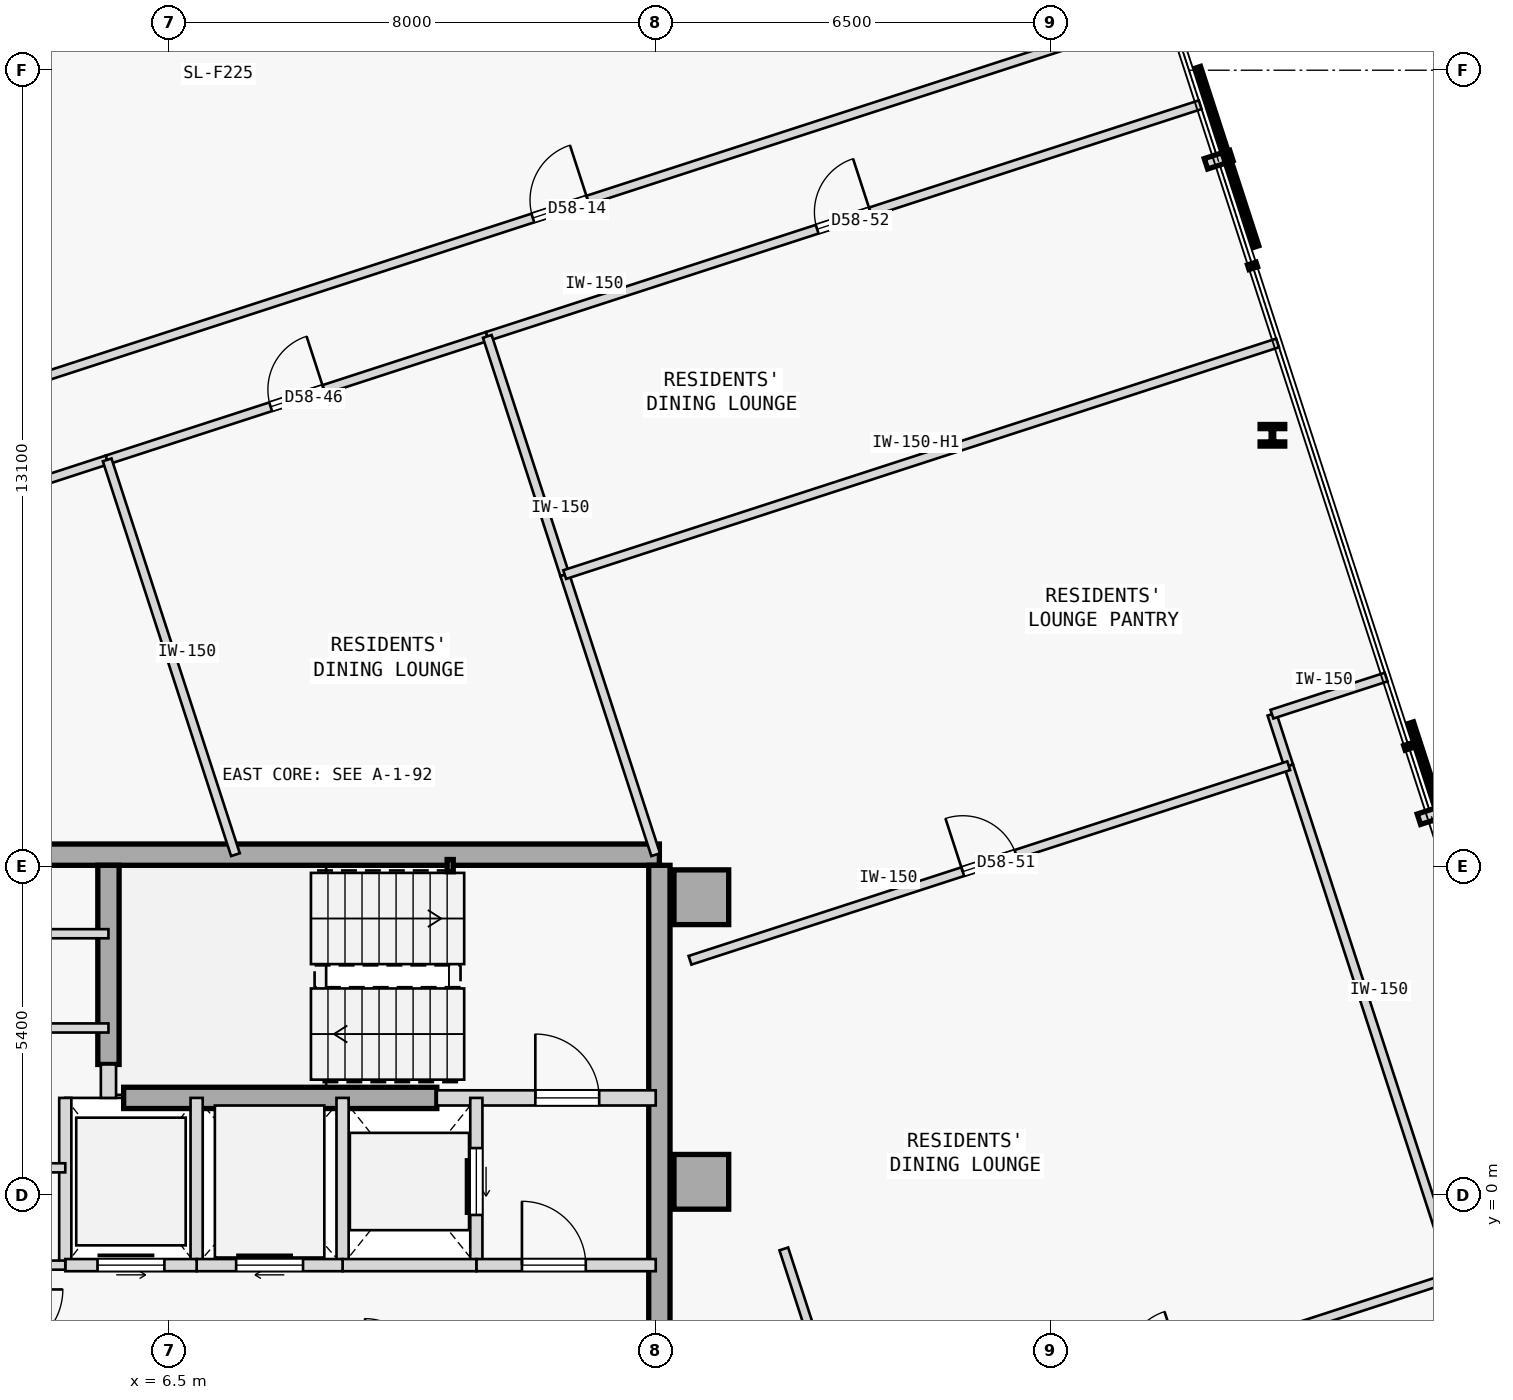
"""IFC4 building model, lengths in metres.
Left out: names, types, materials, properties, quantities, classifications, styles, units other than length and angle.
Written with IfcOpenShell. Run it as: python <this file> out.ifc"""

import sys

from ifc_helpers import new_model, si_unit, direction, frame, frame_2d, origin, origin_2d, place, context, subcontext, project, spatial, rectangle, hollow_rectangle, i_section, extrude, element, fill, save


model = new_model("IFC4")
c1 = context("Model", 3, precision=1e-05, world=origin(), true_north=direction((0.0, 1.0)))
c2 = subcontext(c1, "Body", "Model", "MODEL_VIEW")
j1 = project(units=[si_unit("LENGTHUNIT", "METRE"), si_unit("PLANEANGLEUNIT", "RADIAN")], contexts=[c1])
p1 = place(None, origin())
s1 = spatial("IfcSite", under=j1, at=p1, CompositionType="ELEMENT")
p2 = place(p1, origin())
s2 = spatial("IfcBuilding", under=s1, at=p2, CompositionType="ELEMENT")
p3 = place(p2, frame((0.0, 0.0, 220.95)))
s3 = spatial("IfcBuildingStorey", under=s2, at=p3, CompositionType="ELEMENT", Elevation=220.95)
for number, where, z_axis, x_axis in (
    (1, (15.25, 4.9, 0.0), (0.0, 0.0, 1.0), (1.0, 0.0, 0.0)),
    (2, (15.25, 0.22, 0.0), (0.0, 0.0, 1.0), (1.0, 0.0, 0.0)),
):
    element("IfcColumn", number, at=place(p3, frame(where, z_axis=z_axis, x_axis=x_axis)), inside=s3, PredefinedType="COLUMN", context=c2, shape_type="SweptSolid", body=[
        extrude(rectangle(XDim=0.9, YDim=0.9, at=origin_2d()), origin(), (0.0, 0.0, 1.0), 3.35),
    ])
p4 = place(p3, frame((3.15, 5.6, 0.0), z_axis=(0.0, 0.0, 1.0), x_axis=(1.0, 0.0, 0.0)))
e3 = element("IfcWall", 3, at=p4, inside=s3, PredefinedType="SHEAR", context=c2, shape_type="SweptSolid", body=[
    extrude(rectangle(XDim=11.41, YDim=0.35, at=frame_2d((5.705, 0.0))), origin(), (0.0, 0.0, 1.0), 3.125),
])
p5 = place(p3, frame((14.56, -5.425, 0.0), z_axis=(0.0, 0.0, 1.0), x_axis=(0.0, 1.0, 0.0)))
e4 = element("IfcWall", 4, at=p5, inside=s3, PredefinedType="SHEAR", context=c2, shape_type="SweptSolid", body=[
    extrude(rectangle(XDim=10.85, YDim=0.35, at=frame_2d((5.425, 0.0))), origin(), (0.0, 0.0, 1.0), 3.125),
])
p6 = place(p3, frame((5.5, 2.15, 0.0), z_axis=(0.0, 0.0, 1.0), x_axis=(0.0, 1.0, 0.0)))
e5 = element("IfcWall", 5, at=p6, inside=s3, PredefinedType="SHEAR", context=c2, shape_type="SweptSolid", body=[
    extrude(rectangle(XDim=3.275, YDim=0.35, at=frame_2d((1.638, 0.0))), origin(), (0.0, 0.0, 1.0), 3.125),
])
p7 = place(p3, frame((5.75, 1.6, 0.0), z_axis=(0.0, 0.0, 1.0), x_axis=(1.0, 0.0, 0.0)))
e6 = element("IfcWall", 6, at=p7, inside=s3, PredefinedType="SHEAR", context=c2, shape_type="SweptSolid", body=[
    extrude(rectangle(XDim=5.15, YDim=0.35, at=frame_2d((2.575, 0.0))), origin(), (0.0, 0.0, 1.0), 3.125),
])
p8 = place(p3, frame((11.12, 5.42, 0.0), z_axis=(0.0, 0.0, 1.0), x_axis=(1.0, 0.0, 0.0)))
e7 = element("IfcColumn", 7, at=p8, inside=s3, PredefinedType="COLUMN", context=c2, shape_type="SweptSolid", body=[
    extrude(hollow_rectangle(XDim=0.1, YDim=0.2, WallThickness=0.008, at=origin_2d()), origin(), (0.0, 0.0, 1.0), 3.35),
])
p9 = place(p3, frame((24.642, 12.497, 0.0), z_axis=(0.0, 0.0, 1.0), x_axis=(1.0, 0.0, 0.0)))
e8 = element("IfcColumn", 8, at=p9, inside=s3, PredefinedType="COLUMN", context=c2, shape_type="SweptSolid", body=[
    extrude(i_section(OverallWidth=0.405, OverallDepth=0.355, WebThickness=0.042, FlangeThickness=0.068, FilletRadius=0.015, at=origin_2d()), origin(), (0.0, 0.0, 1.0), 3.35),
])
p10 = place(p3, frame((10.9, 1.6, 0.0), z_axis=(0.0, 0.0, 1.0), x_axis=(1.0, 0.0, 0.0)))
e9 = element("IfcWall", 9, at=p10, inside=s3, PredefinedType="STANDARD", context=c2, shape_type="SweptSolid", body=[
    extrude(rectangle(XDim=3.6, YDim=0.25, at=frame_2d((1.8, 0.0))), origin(), (0.0, 0.0, 1.0), 3.125),
])
p11 = place(p10, frame((1.62, 0.0, 0.0)))
e10 = element("IfcOpeningElement", 10, at=p11, cuts=e9, PredefinedType="OPENING", context=c2, shape_type="SweptSolid", body=[
    extrude(rectangle(XDim=1.05, YDim=2.15, at=frame_2d((0.525, 1.075))), frame((0.0, 0.135, 0.0), z_axis=(0.0, -1.0, 0.0), x_axis=(1.0, 0.0, 0.0)), (0.0, 0.0, 1.0), 0.27),
])
p12 = place(p3, frame((5.5, 1.6, 0.0), z_axis=(0.0, 0.0, 1.0), x_axis=(0.0, 1.0, 0.0)))
e11 = element("IfcWall", 11, at=p12, inside=s3, PredefinedType="STANDARD", context=c2, shape_type="SweptSolid", body=[
    extrude(rectangle(XDim=0.55, YDim=0.25, at=frame_2d((0.275, 0.0))), origin(), (0.0, 0.0, 1.0), 3.125),
])
p13 = place(p3, frame((11.55, -1.15, 0.0), z_axis=(0.0, 0.0, 1.0), x_axis=(0.0, 1.0, 0.0)))
e12 = element("IfcWall", 12, at=p13, inside=s3, PredefinedType="STANDARD", context=c2, shape_type="SweptSolid", body=[
    extrude(rectangle(XDim=2.75, YDim=0.2, at=frame_2d((1.375, 0.0))), origin(), (0.0, 0.0, 1.0), 3.125),
])
p14 = place(p13, frame((0.825, 0.0, 0.0)))
e13 = element("IfcOpeningElement", 13, at=p14, cuts=e12, PredefinedType="OPENING", context=c2, shape_type="SweptSolid", body=[
    extrude(rectangle(XDim=1.1, YDim=2.15, at=frame_2d((0.55, 1.075))), frame((0.0, 0.11, 0.0), z_axis=(0.0, -1.0, 0.0), x_axis=(1.0, 0.0, 0.0)), (0.0, 0.0, 1.0), 0.22),
])
p15 = place(p3, frame((9.35, -1.15, 0.0), z_axis=(0.0, 0.0, 1.0), x_axis=(0.0, 1.0, 0.0)))
e14 = element("IfcWall", 14, at=p15, inside=s3, PredefinedType="STANDARD", context=c2, shape_type="SweptSolid", body=[
    extrude(rectangle(XDim=2.75, YDim=0.2, at=frame_2d((1.375, 0.0))), origin(), (0.0, 0.0, 1.0), 3.125),
])
p16 = place(p3, frame((11.55, -1.15, 0.0), z_axis=(0.0, 0.0, 1.0), x_axis=(1.0, 0.0, 0.0)))
e15 = element("IfcWall", 15, at=p16, inside=s3, PredefinedType="STANDARD", context=c2, shape_type="SweptSolid", body=[
    extrude(rectangle(XDim=2.95, YDim=0.2, at=frame_2d((1.475, 0.0))), origin(), (0.0, 0.0, 1.0), 3.125),
])
p17 = place(p16, frame((0.75, 0.0, 0.0)))
e16 = element("IfcOpeningElement", 16, at=p17, cuts=e15, PredefinedType="OPENING", context=c2, shape_type="SweptSolid", body=[
    extrude(rectangle(XDim=1.05, YDim=2.18, at=frame_2d((0.525, 1.09))), frame((0.0, 0.11, 0.0), z_axis=(0.0, -1.0, 0.0), x_axis=(1.0, 0.0, 0.0)), (0.0, 0.0, 1.0), 0.22),
])
p18 = place(p3, frame((9.35, -1.15, 0.0), z_axis=(0.0, 0.0, 1.0), x_axis=(1.0, 0.0, 0.0)))
e17 = element("IfcWall", 17, at=p18, inside=s3, PredefinedType="STANDARD", context=c2, shape_type="SweptSolid", body=[
    extrude(rectangle(XDim=2.2, YDim=0.2, at=frame_2d((1.1, 0.0))), origin(), (0.0, 0.0, 1.0), 3.125),
])
p19 = place(p3, frame((6.95, -1.15, 0.0), z_axis=(0.0, 0.0, 1.0), x_axis=(0.0, 1.0, 0.0)))
e18 = element("IfcWall", 18, at=p19, inside=s3, PredefinedType="STANDARD", context=c2, shape_type="SweptSolid", body=[
    extrude(rectangle(XDim=2.75, YDim=0.2, at=frame_2d((1.375, 0.0))), origin(), (0.0, 0.0, 1.0), 3.125),
])
p20 = place(p3, frame((6.95, -1.15, 0.0), z_axis=(0.0, 0.0, 1.0), x_axis=(1.0, 0.0, 0.0)))
e19 = element("IfcWall", 19, at=p20, inside=s3, PredefinedType="STANDARD", context=c2, shape_type="SweptSolid", body=[
    extrude(rectangle(XDim=2.4, YDim=0.2, at=frame_2d((1.2, 0.0))), origin(), (0.0, 0.0, 1.0), 3.125),
])
p21 = place(p20, frame((0.65, 0.0, 0.0)))
e20 = element("IfcOpeningElement", 20, at=p21, cuts=e19, PredefinedType="OPENING", context=c2, shape_type="SweptSolid", body=[
    extrude(rectangle(XDim=1.1, YDim=2.15, at=frame_2d((0.55, 1.075))), frame((0.0, 0.11, 0.0), z_axis=(0.0, -1.0, 0.0), x_axis=(1.0, 0.0, 0.0)), (0.0, 0.0, 1.0), 0.22),
])
p22 = place(p3, frame((4.79, -1.15, 0.0), z_axis=(0.0, 0.0, 1.0), x_axis=(0.0, 1.0, 0.0)))
e21 = element("IfcWall", 21, at=p22, inside=s3, PredefinedType="STANDARD", context=c2, shape_type="SweptSolid", body=[
    extrude(rectangle(XDim=2.75, YDim=0.2, at=frame_2d((1.375, 0.0))), origin(), (0.0, 0.0, 1.0), 3.125),
])
p23 = place(p3, frame((4.79, -1.15, 0.0), z_axis=(0.0, 0.0, 1.0), x_axis=(1.0, 0.0, 0.0)))
e22 = element("IfcWall", 22, at=p23, inside=s3, PredefinedType="STANDARD", context=c2, shape_type="SweptSolid", body=[
    extrude(rectangle(XDim=2.16, YDim=0.2, at=frame_2d((1.08, 0.0))), origin(), (0.0, 0.0, 1.0), 3.125),
])
p24 = place(p23, frame((0.53, 0.0, 0.0)))
e23 = element("IfcOpeningElement", 23, at=p24, cuts=e22, PredefinedType="OPENING", context=c2, shape_type="SweptSolid", body=[
    extrude(rectangle(XDim=1.1, YDim=2.15, at=frame_2d((0.55, 1.075))), frame((0.0, 0.11, 0.0), z_axis=(0.0, -1.0, 0.0), x_axis=(1.0, 0.0, 0.0)), (0.0, 0.0, 1.0), 0.22),
])
p25 = place(p3, frame((3.7, -1.15, 0.0), z_axis=(0.0, 0.0, 1.0), x_axis=(1.0, 0.0, 0.0)))
e24 = element("IfcWall", 24, at=p25, inside=s3, PredefinedType="PARTITIONING", context=c2, shape_type="SweptSolid", body=[
    extrude(rectangle(XDim=1.09, YDim=0.15, at=frame_2d((0.545, 0.0))), origin(), (0.0, 0.0, 1.0), 3.125),
])
p26 = place(p3, frame((3.7, 4.3, 0.0), z_axis=(0.0, 0.0, 1.0), x_axis=(1.0, 0.0, 0.0)))
e25 = element("IfcWall", 25, at=p26, inside=s3, PredefinedType="PARTITIONING", context=c2, shape_type="SweptSolid", body=[
    extrude(rectangle(XDim=1.8, YDim=0.15, at=frame_2d((0.9, 0.0))), origin(), (0.0, 0.0, 1.0), 3.125),
])
p27 = place(p3, frame((3.7, 0.45, 0.0), z_axis=(0.0, 0.0, 1.0), x_axis=(1.0, 0.0, 0.0)))
e26 = element("IfcWall", 26, at=p27, inside=s3, PredefinedType="PARTITIONING", context=c2, shape_type="SweptSolid", body=[
    extrude(rectangle(XDim=1.09, YDim=0.15, at=frame_2d((0.545, 0.0))), origin(), (0.0, 0.0, 1.0), 3.125),
])
p28 = place(p3, frame((3.7, 2.75, 0.0), z_axis=(0.0, 0.0, 1.0), x_axis=(1.0, 0.0, 0.0)))
e27 = element("IfcWall", 27, at=p28, inside=s3, PredefinedType="PARTITIONING", context=c2, shape_type="SweptSolid", body=[
    extrude(rectangle(XDim=1.8, YDim=0.15, at=frame_2d((0.9, 0.0))), origin(), (0.0, 0.0, 1.0), 3.125),
])
p29 = place(p3, frame((2.909, 12.96, 0.0), z_axis=(0.0, 0.0, 1.0), x_axis=(0.951056113966, 0.309018232614, 0.0)))
e28 = element("IfcWall", 28, at=p29, inside=s3, PredefinedType="PARTITIONING", context=c2, shape_type="SweptSolid", body=[
    extrude(rectangle(XDim=21.076, YDim=0.15, at=frame_2d((10.538, 0.0))), origin(), (0.0, 0.0, 1.0), 3.125),
])
p30 = place(p29, frame((10.063, 0.0, 0.0)))
e29 = element("IfcOpeningElement", 29, at=p30, cuts=e28, PredefinedType="OPENING", context=c2, shape_type="SweptSolid", body=[
    extrude(rectangle(XDim=0.95, YDim=2.15, at=frame_2d((0.475, 1.075))), frame((0.0, 0.085, 0.0), z_axis=(0.0, -1.0, 0.0), x_axis=(1.0, 0.0, 0.0)), (0.0, 0.0, 1.0), 0.17),
])
p31 = place(p3, frame((3.699, 11.514, 0.0), z_axis=(0.0, 0.0, 1.0), x_axis=(0.951069540665, 0.308976906612, 0.0)))
e30 = element("IfcWall", 30, at=p31, inside=s3, PredefinedType="PARTITIONING", context=c2, shape_type="SweptSolid", body=[
    extrude(rectangle(XDim=1.871, YDim=0.15, at=frame_2d((0.936, 0.0))), origin(), (0.0, 0.0, 1.0), 3.125),
])
p32 = place(p3, frame((5.479, 12.092, 0.0), z_axis=(0.0, 0.0, 1.0), x_axis=(0.951051809397, 0.309031480343, 0.0)))
e31 = element("IfcWall", 31, at=p32, inside=s3, PredefinedType="PARTITIONING", context=c2, shape_type="SweptSolid", body=[
    extrude(rectangle(XDim=6.573, YDim=0.15, at=frame_2d((3.287, 0.0))), origin(), (0.0, 0.0, 1.0), 3.125),
])
p33 = place(p32, frame((2.826, 0.0, 0.0)))
e32 = element("IfcOpeningElement", 32, at=p33, cuts=e31, PredefinedType="OPENING", context=c2, shape_type="SweptSolid", body=[
    extrude(rectangle(XDim=0.92, YDim=2.15, at=frame_2d((0.46, 1.075))), frame((0.0, 0.085, 0.0), z_axis=(0.0, -1.0, 0.0), x_axis=(1.0, 0.0, 0.0)), (0.0, 0.0, 1.0), 0.17),
])
p34 = place(p3, frame((17.791, -4.531, 0.0), z_axis=(0.0, 0.0, 1.0), x_axis=(0.951056769902, 0.309016213852, 0.0)))
e33 = element("IfcWall", 33, at=p34, inside=s3, PredefinedType="PARTITIONING", context=c2, shape_type="SweptSolid", body=[
    extrude(rectangle(XDim=10.352, YDim=0.15, at=frame_2d((5.176, 0.0))), origin(), (0.0, 0.0, 1.0), 3.125),
])
p35 = place(p34, frame((4.716, 0.0, 0.0)))
e34 = element("IfcOpeningElement", 34, at=p35, cuts=e33, PredefinedType="OPENING", context=c2, shape_type="SweptSolid", body=[
    extrude(rectangle(XDim=0.92, YDim=2.15, at=frame_2d((0.46, 1.075))), frame((0.0, 0.085, 0.0), z_axis=(0.0, -1.0, 0.0), x_axis=(1.0, 0.0, 0.0)), (0.0, 0.0, 1.0), 0.17),
])
p36 = place(p3, frame((27.637, -1.332, 0.0), z_axis=(0.0, 0.0, 1.0), x_axis=(-0.309040411618, 0.951048907253, 0.0)))
e35 = element("IfcWall", 35, at=p36, inside=s3, PredefinedType="PARTITIONING", context=c2, shape_type="SweptSolid", body=[
    extrude(rectangle(XDim=8.826, YDim=0.15, at=frame_2d((4.413, 0.0))), origin(), (0.0, 0.0, 1.0), 3.125),
])
p37 = place(p3, frame((24.909, 7.062, 0.0), z_axis=(0.0, 0.0, 1.0), x_axis=(-0.30899324298, 0.951064233263, 0.0)))
e36 = element("IfcWall", 36, at=p37, inside=s3, PredefinedType="PARTITIONING", context=c2, shape_type="SweptSolid", body=[
    extrude(rectangle(XDim=0.892, YDim=0.15, at=frame_2d((0.446, 0.0))), origin(), (0.0, 0.0, 1.0), 3.125),
])
p38 = place(p3, frame((24.634, 7.91, 0.0), z_axis=(0.0, 0.0, 1.0), x_axis=(0.951054051148, 0.309024581215, 0.0)))
e37 = element("IfcWall", 37, at=p38, inside=s3, PredefinedType="PARTITIONING", context=c2, shape_type="SweptSolid", body=[
    extrude(rectangle(XDim=1.975, YDim=0.15, at=frame_2d((0.988, 0.0))), origin(), (0.0, 0.0, 1.0), 3.125),
])
p39 = place(p3, frame((11.73, 14.123, 0.0), z_axis=(0.0, 0.0, 1.0), x_axis=(0.951060263663, 0.309005460926, 0.0)))
e38 = element("IfcWall", 38, at=p39, inside=s3, PredefinedType="PARTITIONING", context=c2, shape_type="SweptSolid", body=[
    extrude(rectangle(XDim=12.327, YDim=0.15, at=frame_2d((6.164, 0.0))), origin(), (0.0, 0.0, 1.0), 3.125),
])
p40 = place(p39, frame((5.704, 0.0, 0.0)))
e39 = element("IfcOpeningElement", 39, at=p40, cuts=e38, PredefinedType="OPENING", context=c2, shape_type="SweptSolid", body=[
    extrude(rectangle(XDim=0.92, YDim=2.15, at=frame_2d((0.46, 1.075))), frame((0.0, 0.085, 0.0), z_axis=(0.0, -1.0, 0.0), x_axis=(1.0, 0.0, 0.0)), (0.0, 0.0, 1.0), 0.17),
])
p41 = place(p3, frame((17.791, -4.531, 0.0), z_axis=(0.0, 0.0, 1.0), x_axis=(-0.309018414265, 0.951056054944, 0.0)))
e40 = element("IfcWall", 40, at=p41, inside=s3, PredefinedType="PARTITIONING", context=c2, shape_type="SweptSolid", body=[
    extrude(rectangle(XDim=3.835, YDim=0.15, at=frame_2d((1.917, 0.0))), origin(), (0.0, 0.0, 1.0), 3.125),
])
p42 = place(p3, frame((7.588, 5.6, 0.0), z_axis=(0.0, 0.0, 1.0), x_axis=(-0.309018946982, 0.951055881852, 0.0)))
e41 = element("IfcWall", 41, at=p42, inside=s3, PredefinedType="PARTITIONING", context=c2, shape_type="SweptSolid", body=[
    extrude(rectangle(XDim=6.826, YDim=0.15, at=frame_2d((3.413, 0.0))), origin(), (0.0, 0.0, 1.0), 3.125),
])
p43 = place(p3, frame((14.5, 5.6, 0.0), z_axis=(0.0, 0.0, 1.0), x_axis=(-0.308974360462, 0.951070367837, 0.0)))
e42 = element("IfcWall", 42, at=p43, inside=s3, PredefinedType="PARTITIONING", context=c2, shape_type="SweptSolid", body=[
    extrude(rectangle(XDim=4.843, YDim=0.15, at=frame_2d((2.421, 0.0))), origin(), (0.0, 0.0, 1.0), 3.125),
])
p44 = place(p3, frame((13.003, 10.206, 0.0), z_axis=(0.0, 0.0, 1.0), x_axis=(-0.309035144366, 0.951050618814, 0.0)))
e43 = element("IfcWall", 43, at=p44, inside=s3, PredefinedType="PARTITIONING", context=c2, shape_type="SweptSolid", body=[
    extrude(rectangle(XDim=4.119, YDim=0.15, at=frame_2d((2.06, 0.0))), origin(), (0.0, 0.0, 1.0), 3.125),
])
p45 = place(p3, frame((15.064, 3.863, 0.0), z_axis=(0.0, 0.0, 1.0), x_axis=(0.951061448945, 0.309001812827, 0.0)))
e44 = element("IfcWall", 44, at=p45, inside=s3, PredefinedType="PARTITIONING", context=c2, shape_type="SweptSolid", body=[
    extrude(rectangle(XDim=10.352, YDim=0.15, at=frame_2d((5.176, 0.0))), origin(), (0.0, 0.0, 1.0), 3.125),
])
p46 = place(p45, frame((4.716, 0.0, 0.0)))
e45 = element("IfcOpeningElement", 45, at=p46, cuts=e44, PredefinedType="OPENING", context=c2, shape_type="SweptSolid", body=[
    extrude(rectangle(XDim=0.92, YDim=2.15, at=frame_2d((0.46, 1.075))), frame((0.0, 0.085, 0.0), z_axis=(0.0, -1.0, 0.0), x_axis=(1.0, 0.0, 0.0)), (0.0, 0.0, 1.0), 0.17),
])
p47 = place(p3, frame((13.003, 10.206, 0.0), z_axis=(0.0, 0.0, 1.0), x_axis=(0.951060263663, 0.309005460926, 0.0)))
e46 = element("IfcWall", 46, at=p47, inside=s3, PredefinedType="PARTITIONING", context=c2, shape_type="SweptSolid", body=[
    extrude(rectangle(XDim=12.327, YDim=0.15, at=frame_2d((6.164, 0.0))), origin(), (0.0, 0.0, 1.0), 2.675),
])
p48 = place(p11, origin())
e47 = element("IfcDoor", 47, at=p48, inside=s3, OperationType="SINGLE_SWING_LEFT", PredefinedType="DOOR", context=c2, shape_type="SweptSolid", body=[
    extrude(rectangle(XDim=1.05, YDim=2.15, at=frame_2d((0.525, 1.075))), frame((0.0, 0.025, 0.0), z_axis=(0.0, -1.0, 0.0), x_axis=(1.0, 0.0, 0.0)), (0.0, 0.0, 1.0), 0.05),
])
fill(e10, e47)
p49 = place(p17, origin())
e48 = element("IfcDoor", 48, at=p49, inside=s3, OperationType="SINGLE_SWING_LEFT", PredefinedType="DOOR", context=c2, shape_type="SweptSolid", body=[
    extrude(rectangle(XDim=1.05, YDim=2.18, at=frame_2d((0.525, 1.09))), frame((0.0, 0.025, 0.0), z_axis=(0.0, -1.0, 0.0), x_axis=(1.0, 0.0, 0.0)), (0.0, 0.0, 1.0), 0.05),
])
fill(e16, e48)
p50 = place(p14, origin())
e49 = element("IfcDoor", 49, at=p50, inside=s3, OperationType="SLIDING_TO_RIGHT", PredefinedType="DOOR", context=c2, shape_type="SweptSolid", body=[
    extrude(rectangle(XDim=1.1, YDim=2.15, at=frame_2d((0.55, 1.075))), frame((0.0, 0.025, 0.0), z_axis=(0.0, -1.0, 0.0), x_axis=(1.0, 0.0, 0.0)), (0.0, 0.0, 1.0), 0.05),
])
fill(e13, e49)
p51 = place(p21, origin())
e50 = element("IfcDoor", 50, at=p51, inside=s3, OperationType="SLIDING_TO_RIGHT", PredefinedType="DOOR", context=c2, shape_type="SweptSolid", body=[
    extrude(rectangle(XDim=1.1, YDim=2.15, at=frame_2d((0.55, 1.075))), frame((0.0, 0.025, 0.0), z_axis=(0.0, -1.0, 0.0), x_axis=(1.0, 0.0, 0.0)), (0.0, 0.0, 1.0), 0.05),
])
fill(e20, e50)
p52 = place(p24, origin())
e51 = element("IfcDoor", 51, at=p52, inside=s3, OperationType="SLIDING_TO_LEFT", PredefinedType="DOOR", context=c2, shape_type="SweptSolid", body=[
    extrude(rectangle(XDim=1.1, YDim=2.15, at=frame_2d((0.55, 1.075))), frame((0.0, 0.025, 0.0), z_axis=(0.0, -1.0, 0.0), x_axis=(1.0, 0.0, 0.0)), (0.0, 0.0, 1.0), 0.05),
])
fill(e23, e51)
p53 = place(p30, origin())
e52 = element("IfcDoor", 52, at=p53, inside=s3, OperationType="SINGLE_SWING_RIGHT", PredefinedType="DOOR", context=c2, shape_type="SweptSolid", body=[
    extrude(rectangle(XDim=0.95, YDim=2.15, at=frame_2d((0.475, 1.075))), frame((0.0, 0.025, 0.0), z_axis=(0.0, -1.0, 0.0), x_axis=(1.0, 0.0, 0.0)), (0.0, 0.0, 1.0), 0.05),
])
fill(e29, e52)
p54 = place(p33, origin())
e53 = element("IfcDoor", 53, at=p54, inside=s3, OperationType="SINGLE_SWING_RIGHT", PredefinedType="DOOR", context=c2, shape_type="SweptSolid", body=[
    extrude(rectangle(XDim=0.92, YDim=2.15, at=frame_2d((0.46, 1.075))), frame((0.0, 0.025, 0.0), z_axis=(0.0, -1.0, 0.0), x_axis=(1.0, 0.0, 0.0)), (0.0, 0.0, 1.0), 0.05),
])
fill(e32, e53)
p55 = place(p46, origin())
e54 = element("IfcDoor", 54, at=p55, inside=s3, OperationType="SINGLE_SWING_LEFT", PredefinedType="DOOR", context=c2, shape_type="SweptSolid", body=[
    extrude(rectangle(XDim=0.92, YDim=2.15, at=frame_2d((0.46, 1.075))), frame((0.0, 0.025, 0.0), z_axis=(0.0, -1.0, 0.0), x_axis=(1.0, 0.0, 0.0)), (0.0, 0.0, 1.0), 0.05),
])
fill(e45, e54)
p56 = place(p40, origin())
e55 = element("IfcDoor", 55, at=p56, inside=s3, OperationType="SINGLE_SWING_RIGHT", PredefinedType="DOOR", context=c2, shape_type="SweptSolid", body=[
    extrude(rectangle(XDim=0.92, YDim=2.15, at=frame_2d((0.46, 1.075))), frame((0.0, 0.025, 0.0), z_axis=(0.0, -1.0, 0.0), x_axis=(1.0, 0.0, 0.0)), (0.0, 0.0, 1.0), 0.05),
])
fill(e39, e55)
save(model, sys.argv[1])
